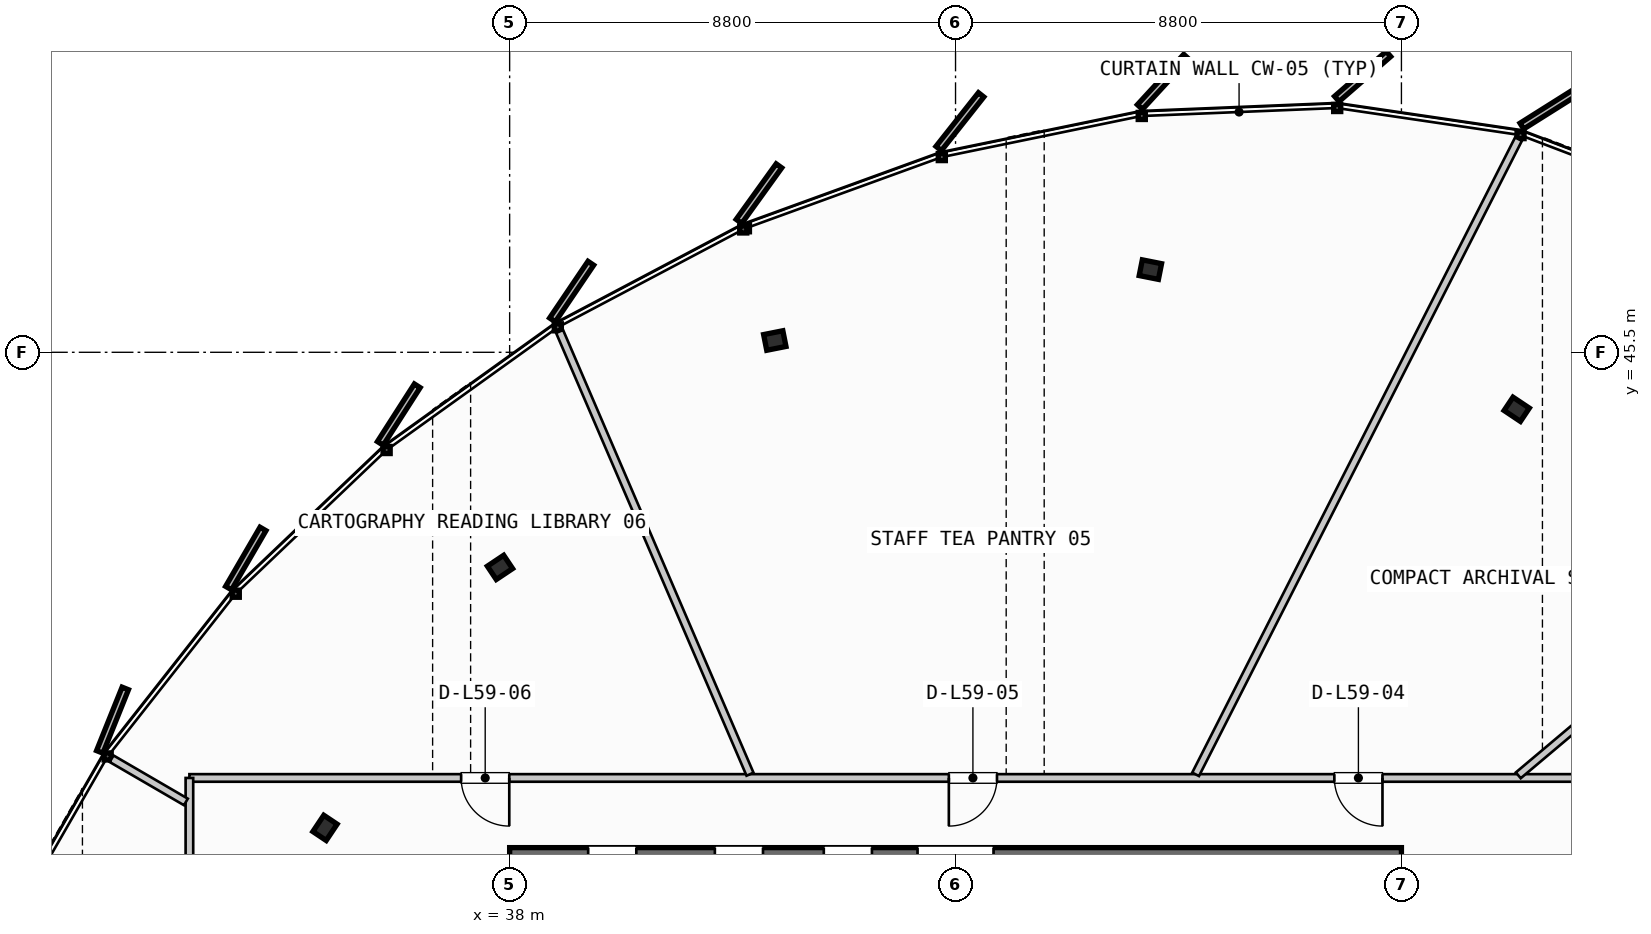
"""IFC4 building model, lengths in metres.
Left out: names, types, materials, properties, quantities, classifications, styles, units other than length and angle.
Written with IfcOpenShell. Run it as: python <this file> out.ifc"""

import sys

from ifc_helpers import new_model, si_unit, direction, frame, frame_2d, origin, origin_2d, place, context, subcontext, project, spatial, rectangle, i_section, extrude, source, transform, mapped, element, fill, save


model = new_model("IFC4")
c1 = context("Model", 3, precision=1e-05, world=origin(), true_north=direction((0.0, 1.0)))
c2 = subcontext(c1, "Body", "Model", "MODEL_VIEW")
j1 = project(units=[si_unit("LENGTHUNIT", "METRE"), si_unit("PLANEANGLEUNIT", "RADIAN")], contexts=[c1])
p1 = place(None, origin())
s1 = spatial("IfcSite", under=j1, at=p1, CompositionType="ELEMENT")
p2 = place(p1, origin())
s2 = spatial("IfcBuilding", under=s1, at=p2, CompositionType="ELEMENT")
p3 = place(p2, frame((0.0, 0.0, 228.4)))
s3 = spatial("IfcBuildingStorey", under=s2, at=p3, CompositionType="ELEMENT", Elevation=228.4)
p4 = place(p3, frame((55.6, 35.5, 0.0), z_axis=(0.0, 0.0, 1.0), x_axis=(-1.0, 0.0, 0.0)))
e1 = element("IfcWall", 1, at=p4, inside=s3, PredefinedType="SHEAR", context=c2, shape_type="SweptSolid", body=[
    extrude(rectangle(XDim=17.6, YDim=0.45, at=frame_2d((8.8, 0.0))), origin(), (0.0, 0.0, 1.0), 3.21),
])
p5 = place(p4, frame((8.05, 0.0, 0.0)))
e2 = element("IfcOpeningElement", 2, at=p5, cuts=e1, PredefinedType="OPENING", context=c2, shape_type="SweptSolid", body=[
    extrude(rectangle(XDim=1.5, YDim=2.2, at=frame_2d((0.75, 1.1))), frame((0.0, 0.235, 0.0), z_axis=(0.0, -1.0, 0.0), x_axis=(1.0, 0.0, 0.0)), (0.0, 0.0, 1.0), 0.47),
])
p6 = place(p4, frame((15.1, 0.0, 0.0)))
e3 = element("IfcOpeningElement", 3, at=p6, cuts=e1, PredefinedType="OPENING", context=c2, shape_type="SweptSolid", body=[
    extrude(rectangle(XDim=0.95, YDim=2.15, at=frame_2d((0.475, 1.075))), frame((0.0, 0.235, 0.0), z_axis=(0.0, -1.0, 0.0), x_axis=(1.0, 0.0, 0.0)), (0.0, 0.0, 1.0), 0.47),
])
p7 = place(p4, frame((12.6, 0.0, 0.0)))
e4 = element("IfcOpeningElement", 4, at=p7, cuts=e1, PredefinedType="OPENING", context=c2, shape_type="SweptSolid", body=[
    extrude(rectangle(XDim=0.95, YDim=2.15, at=frame_2d((0.475, 1.075))), frame((0.0, 0.235, 0.0), z_axis=(0.0, -1.0, 0.0), x_axis=(1.0, 0.0, 0.0)), (0.0, 0.0, 1.0), 0.47),
])
p8 = place(p4, frame((10.45, 0.0, 0.0)))
e5 = element("IfcOpeningElement", 5, at=p8, cuts=e1, PredefinedType="OPENING", context=c2, shape_type="SweptSolid", body=[
    extrude(rectangle(XDim=0.95, YDim=2.15, at=frame_2d((0.475, 1.075))), frame((0.0, 0.235, 0.0), z_axis=(0.0, -1.0, 0.0), x_axis=(1.0, 0.0, 0.0)), (0.0, 0.0, 1.0), 0.47),
])
m1 = source(origin(), c2, "Body", "SweptSolid", [
    extrude(i_section(OverallWidth=0.387, OverallDepth=0.316, WebThickness=0.019, FlangeThickness=0.028, FilletRadius=0.015, at=origin_2d()), origin(), (0.0, 0.0, 1.0), 3.21),
])
for number, where, z_axis, x_axis in (
    (6, (57.875, 44.375, 0.0), (0.0, 0.0, 1.0), (0.556, 0.831, 0.0)),
    (7, (50.645, 47.132, 0.0), (0.0, 0.0, 1.0), (0.195, 0.981, 0.0)),
    (8, (43.233, 45.732, 0.0), (0.0, 0.0, 1.0), (-0.195, 0.981, 0.0)),
    (9, (37.81, 41.255, 0.0), (0.0, 0.0, 1.0), (-0.556, 0.831, 0.0)),
    (10, (34.356, 36.115, 0.0), (0.0, 0.0, 1.0), (-0.831, 0.556, 0.0)),
):
    element("IfcColumn", number, at=place(p3, frame(where, z_axis=z_axis, x_axis=x_axis)), inside=s3, PredefinedType="COLUMN", context=c2, shape_type="MappedRepresentation", body=[
        mapped(m1, transform((0.0, 0.0, 0.0), scale=1.0)),
    ])
p9 = place(p3, frame((60.55, 37.1, 0.0), z_axis=(0.0, 0.0, 1.0), x_axis=(-1.0, 0.0, 0.0)))
e11 = element("IfcWall", 11, at=p9, inside=s3, PredefinedType="PARTITIONING", context=c2, shape_type="SweptSolid", body=[
    extrude(rectangle(XDim=28.87, YDim=0.15, at=frame_2d((14.435, 0.0))), origin(), (0.0, 0.0, 1.0), 2.28),
])
p10 = place(p9, frame((5.324, 0.0, 0.0)))
e12 = element("IfcOpeningElement", 12, at=p10, cuts=e11, PredefinedType="OPENING", context=c2, shape_type="SweptSolid", body=[
    extrude(rectangle(XDim=0.95, YDim=2.15, at=frame_2d((0.475, 1.075))), frame((0.0, 0.085, 0.0), z_axis=(0.0, -1.0, 0.0), x_axis=(1.0, 0.0, 0.0)), (0.0, 0.0, 1.0), 0.17),
])
p11 = place(p9, frame((12.932, 0.0, 0.0)))
e13 = element("IfcOpeningElement", 13, at=p11, cuts=e11, PredefinedType="OPENING", context=c2, shape_type="SweptSolid", body=[
    extrude(rectangle(XDim=0.95, YDim=2.15, at=frame_2d((0.475, 1.075))), frame((0.0, 0.085, 0.0), z_axis=(0.0, -1.0, 0.0), x_axis=(1.0, 0.0, 0.0)), (0.0, 0.0, 1.0), 0.17),
])
p12 = place(p9, frame((22.557, 0.0, 0.0)))
e14 = element("IfcOpeningElement", 14, at=p12, cuts=e11, PredefinedType="OPENING", context=c2, shape_type="SweptSolid", body=[
    extrude(rectangle(XDim=0.95, YDim=2.15, at=frame_2d((0.475, 1.075))), frame((0.0, 0.085, 0.0), z_axis=(0.0, -1.0, 0.0), x_axis=(1.0, 0.0, 0.0)), (0.0, 0.0, 1.0), 0.17),
])
p13 = place(p3, frame((31.68, 37.1, 0.0), z_axis=(0.0, 0.0, 1.0), x_axis=(0.0, -1.0, 0.0)))
e15 = element("IfcWall", 15, at=p13, inside=s3, PredefinedType="PARTITIONING", context=c2, shape_type="SweptSolid", body=[
    extrude(rectangle(XDim=18.831, YDim=0.15, at=frame_2d((9.416, 0.0))), origin(), (0.0, 0.0, 1.0), 2.28),
])
p14 = place(p13, frame((8.94, 0.0, 0.0)))
e16 = element("IfcOpeningElement", 16, at=p14, cuts=e15, PredefinedType="OPENING", context=c2, shape_type="SweptSolid", body=[
    extrude(rectangle(XDim=0.95, YDim=2.15, at=frame_2d((0.475, 1.075))), frame((0.0, 0.085, 0.0), z_axis=(0.0, -1.0, 0.0), x_axis=(1.0, 0.0, 0.0)), (0.0, 0.0, 1.0), 0.17),
])
p15 = place(p3, frame((57.906, 37.152, 0.0), z_axis=(0.0, 0.0, 1.0), x_axis=(0.764985580115, 0.644047406808, 0.0)))
e17 = element("IfcWall", 17, at=p15, inside=s3, PredefinedType="PARTITIONING", context=c2, shape_type="SweptSolid", body=[
    extrude(rectangle(XDim=10.639, YDim=0.15, at=frame_2d((5.319, 0.0))), origin(), (0.0, 0.0, 1.0), 2.28),
])
p16 = place(p3, frame((51.538, 37.171, 0.0), z_axis=(0.0, 0.0, 1.0), x_axis=(0.453155713702, 0.891431376573, 0.0)))
e18 = element("IfcWall", 18, at=p16, inside=s3, PredefinedType="PARTITIONING", context=c2, shape_type="SweptSolid", body=[
    extrude(rectangle(XDim=14.061, YDim=0.15, at=frame_2d((7.031, 0.0))), origin(), (0.0, 0.0, 1.0), 2.28),
])
p17 = place(p3, frame((42.744, 37.174, 0.0), z_axis=(0.0, 0.0, 1.0), x_axis=(-0.395114839757, 0.918631734377, 0.0)))
e19 = element("IfcWall", 19, at=p17, inside=s3, PredefinedType="PARTITIONING", context=c2, shape_type="SweptSolid", body=[
    extrude(rectangle(XDim=9.511, YDim=0.15, at=frame_2d((4.755, 0.0))), origin(), (0.0, 0.0, 1.0), 2.28),
])
p18 = place(p3, frame((31.611, 36.626, 0.0), z_axis=(0.0, 0.0, 1.0), x_axis=(-0.864534817788, 0.502572928869, 0.0)))
e20 = element("IfcWall", 20, at=p18, inside=s3, PredefinedType="PARTITIONING", context=c2, shape_type="SweptSolid", body=[
    extrude(rectangle(XDim=1.696, YDim=0.15, at=frame_2d((0.848, 0.0))), origin(), (0.0, 0.0, 1.0), 2.28),
])
m2 = source(origin(), c2, "Body", "SweptSolid", [
    extrude(rectangle(XDim=0.95, YDim=2.15, at=frame_2d((0.475, 1.075))), frame((0.0, 0.025, 0.0), z_axis=(0.0, -1.0, 0.0), x_axis=(1.0, 0.0, 0.0)), (0.0, 0.0, 1.0), 0.05),
])
p19 = place(p10, origin())
e21 = element("IfcDoor", 21, at=p19, inside=s3, OperationType="SINGLE_SWING_LEFT", PredefinedType="DOOR", context=c2, shape_type="MappedRepresentation", body=[
    mapped(m2, transform((0.0, 0.0, 0.0), scale=1.0)),
])
fill(e12, e21)
p20 = place(p11, origin())
e22 = element("IfcDoor", 22, at=p20, inside=s3, OperationType="SINGLE_SWING_RIGHT", PredefinedType="DOOR", context=c2, shape_type="MappedRepresentation", body=[
    mapped(m2, transform((0.0, 0.0, 0.0), scale=1.0)),
])
fill(e13, e22)
p21 = place(p12, origin())
e23 = element("IfcDoor", 23, at=p21, inside=s3, OperationType="SINGLE_SWING_LEFT", PredefinedType="DOOR", context=c2, shape_type="MappedRepresentation", body=[
    mapped(m2, transform((0.0, 0.0, 0.0), scale=1.0)),
])
fill(e14, e23)
save(model, sys.argv[1])
